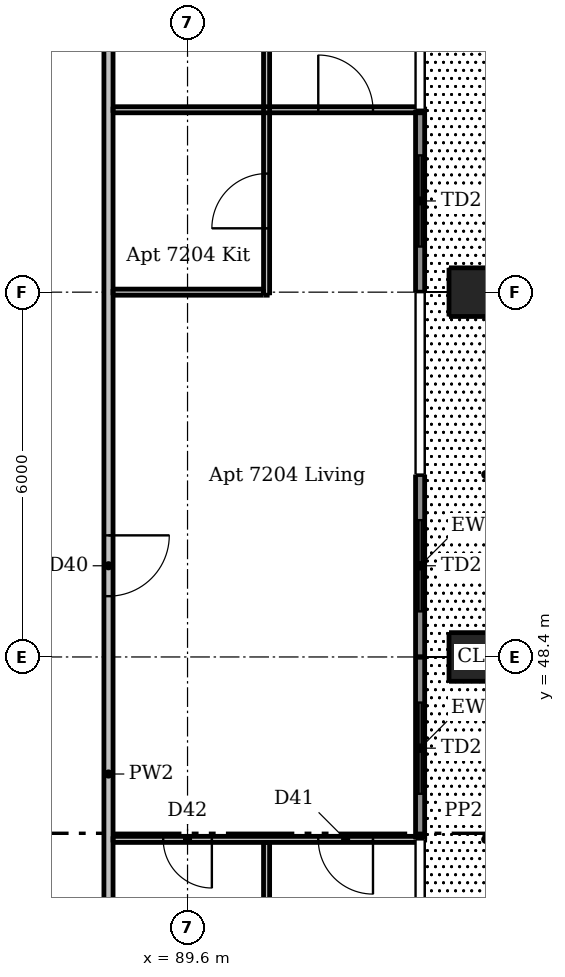
"""IFC4 building model, lengths in metres.
Left out: names, types, materials, properties, quantities, classifications, styles, units other than length and angle.
Written with IfcOpenShell. Run it as: python <this file> out.ifc"""

import sys

from ifc_helpers import new_model, si_unit, direction, frame, frame_2d, origin, origin_2d, place, context, subcontext, project, spatial, rectangle, extrude, element, fill, save


model = new_model("IFC4")
c1 = context("Model", 3, precision=1e-05, world=origin(), true_north=direction((0.0, 1.0)))
c2 = subcontext(c1, "Body", "Model", "MODEL_VIEW")
j1 = project(units=[si_unit("LENGTHUNIT", "METRE"), si_unit("PLANEANGLEUNIT", "RADIAN")], contexts=[c1])
p1 = place(None, origin())
s1 = spatial("IfcSite", under=j1, at=p1, CompositionType="ELEMENT")
p2 = place(p1, origin())
s2 = spatial("IfcBuilding", under=s1, at=p2, CompositionType="ELEMENT")
p3 = place(p2, frame((0.0, 0.0, 268.6)))
s3 = spatial("IfcBuildingStorey", under=s2, at=p3, CompositionType="ELEMENT", Elevation=268.6)
for number, where, z_axis, x_axis in (
    (1, (94.3, 48.4, 0.0), (0.0, 0.0, 1.0), (1.0, 0.0, 0.0)),
    (2, (94.3, 54.4, 0.0), (0.0, 0.0, 1.0), (1.0, 0.0, 0.0)),
):
    element("IfcColumn", number, at=place(p3, frame(where, z_axis=z_axis, x_axis=x_axis)), inside=s3, PredefinedType="COLUMN", context=c2, shape_type="SweptSolid", body=[
        extrude(rectangle(XDim=0.8, YDim=0.8, at=origin_2d()), origin(), (0.0, 0.0, 1.0), 3.3),
    ])
p4 = place(p3, frame((93.425, 45.4, 0.0), z_axis=(0.0, 0.0, 1.0), x_axis=(0.0, 1.0, 0.0)))
e3 = element("IfcWall", 3, at=p4, inside=s3, PredefinedType="SOLIDWALL", context=c2, shape_type="SweptSolid", body=[
    extrude(rectangle(XDim=3.0, YDim=0.15, at=frame_2d((1.5, 0.0))), origin(), (0.0, 0.0, 1.0), 3.05),
])
p5 = place(p4, frame((0.75, 0.0, 0.0)))
e4 = element("IfcOpeningElement", 4, at=p5, cuts=e3, PredefinedType="OPENING", context=c2, shape_type="SweptSolid", body=[
    extrude(rectangle(XDim=1.5, YDim=2.4, at=frame_2d((0.75, 1.2))), frame((0.0, 0.085, 0.0), z_axis=(0.0, -1.0, 0.0), x_axis=(1.0, 0.0, 0.0)), (0.0, 0.0, 1.0), 0.17),
])
p6 = place(p3, frame((93.425, 48.4, 0.0), z_axis=(0.0, 0.0, 1.0), x_axis=(0.0, 1.0, 0.0)))
e5 = element("IfcWall", 5, at=p6, inside=s3, PredefinedType="SOLIDWALL", context=c2, shape_type="SweptSolid", body=[
    extrude(rectangle(XDim=3.0, YDim=0.15, at=frame_2d((1.5, 0.0))), origin(), (0.0, 0.0, 1.0), 3.05),
])
p7 = place(p6, frame((0.75, 0.0, 0.0)))
e6 = element("IfcOpeningElement", 6, at=p7, cuts=e5, PredefinedType="OPENING", context=c2, shape_type="SweptSolid", body=[
    extrude(rectangle(XDim=1.5, YDim=2.4, at=frame_2d((0.75, 1.2))), frame((0.0, 0.085, 0.0), z_axis=(0.0, -1.0, 0.0), x_axis=(1.0, 0.0, 0.0)), (0.0, 0.0, 1.0), 0.17),
])
p8 = place(p3, frame((93.425, 54.4, 0.0), z_axis=(0.0, 0.0, 1.0), x_axis=(0.0, 1.0, 0.0)))
e7 = element("IfcWall", 7, at=p8, inside=s3, PredefinedType="SOLIDWALL", context=c2, shape_type="SweptSolid", body=[
    extrude(rectangle(XDim=3.0, YDim=0.15, at=frame_2d((1.5, 0.0))), origin(), (0.0, 0.0, 1.0), 3.05),
])
p9 = place(p8, frame((0.75, 0.0, 0.0)))
e8 = element("IfcOpeningElement", 8, at=p9, cuts=e7, PredefinedType="OPENING", context=c2, shape_type="SweptSolid", body=[
    extrude(rectangle(XDim=1.5, YDim=2.4, at=frame_2d((0.75, 1.2))), frame((0.0, 0.085, 0.0), z_axis=(0.0, -1.0, 0.0), x_axis=(1.0, 0.0, 0.0)), (0.0, 0.0, 1.0), 0.17),
])
p10 = place(p3, frame((90.9, 41.75, 0.0), z_axis=(0.0, 0.0, 1.0), x_axis=(0.0, 1.0, 0.0)))
e9 = element("IfcWall", 9, at=p10, inside=s3, PredefinedType="PARTITIONING", context=c2, shape_type="SweptSolid", body=[
    extrude(rectangle(XDim=3.6, YDim=0.1, at=frame_2d((1.8, 0.0))), origin(), (0.0, 0.0, 1.0), 3.05),
])
p11 = place(p3, frame((90.9, 54.35, 0.0), z_axis=(0.0, 0.0, 1.0), x_axis=(0.0, 1.0, 0.0)))
e10 = element("IfcWall", 10, at=p11, inside=s3, PredefinedType="PARTITIONING", context=c2, shape_type="SweptSolid", body=[
    extrude(rectangle(XDim=5.975, YDim=0.1, at=frame_2d((2.987, 0.0))), origin(), (0.0, 0.0, 1.0), 3.05),
])
p12 = place(p11, frame((1.1, 0.0, 0.0)))
e11 = element("IfcOpeningElement", 11, at=p12, cuts=e10, PredefinedType="OPENING", context=c2, shape_type="SweptSolid", body=[
    extrude(rectangle(XDim=0.9, YDim=2.1, at=frame_2d((0.45, 1.05))), frame((0.0, 0.06, 0.0), z_axis=(0.0, -1.0, 0.0), x_axis=(1.0, 0.0, 0.0)), (0.0, 0.0, 1.0), 0.12),
])
p13 = place(p11, frame((4.15, 0.0, 0.0)))
e12 = element("IfcOpeningElement", 12, at=p13, cuts=e10, PredefinedType="OPENING", context=c2, shape_type="SweptSolid", body=[
    extrude(rectangle(XDim=0.8, YDim=2.1, at=frame_2d((0.4, 1.05))), frame((0.0, 0.06, 0.0), z_axis=(0.0, -1.0, 0.0), x_axis=(1.0, 0.0, 0.0)), (0.0, 0.0, 1.0), 0.12),
])
p14 = place(p3, frame((88.375, 57.4, 0.0), z_axis=(0.0, 0.0, 1.0), x_axis=(1.0, 0.0, 0.0)))
e13 = element("IfcWall", 13, at=p14, inside=s3, PredefinedType="PARTITIONING", context=c2, shape_type="SweptSolid", body=[
    extrude(rectangle(XDim=5.125, YDim=0.1, at=frame_2d((2.562, 0.0))), origin(), (0.0, 0.0, 1.0), 3.05),
])
p15 = place(p14, frame((3.375, 0.0, 0.0)))
e14 = element("IfcOpeningElement", 14, at=p15, cuts=e13, PredefinedType="OPENING", context=c2, shape_type="SweptSolid", body=[
    extrude(rectangle(XDim=0.9, YDim=2.1, at=frame_2d((0.45, 1.05))), frame((0.0, 0.06, 0.0), z_axis=(0.0, -1.0, 0.0), x_axis=(1.0, 0.0, 0.0)), (0.0, 0.0, 1.0), 0.12),
])
p16 = place(p3, frame((88.375, 54.4, 0.0), z_axis=(0.0, 0.0, 1.0), x_axis=(1.0, 0.0, 0.0)))
e15 = element("IfcWall", 15, at=p16, inside=s3, PredefinedType="PARTITIONING", context=c2, shape_type="SweptSolid", body=[
    extrude(rectangle(XDim=2.475, YDim=0.1, at=frame_2d((1.238, 0.0))), origin(), (0.0, 0.0, 1.0), 2.59),
])
p17 = place(p3, frame((93.5, 45.4, 0.0), z_axis=(0.0, 0.0, 1.0), x_axis=(-1.0, 0.0, 0.0)))
e16 = element("IfcWall", 16, at=p17, inside=s3, PredefinedType="PARTITIONING", context=c2, shape_type="SweptSolid", body=[
    extrude(rectangle(XDim=5.125, YDim=0.1, at=frame_2d((2.562, 0.0))), origin(), (0.0, 0.0, 1.0), 3.05),
])
p18 = place(p17, frame((0.85, 0.0, 0.0)))
e17 = element("IfcOpeningElement", 17, at=p18, cuts=e16, PredefinedType="OPENING", context=c2, shape_type="SweptSolid", body=[
    extrude(rectangle(XDim=0.9, YDim=2.1, at=frame_2d((0.45, 1.05))), frame((0.0, 0.06, 0.0), z_axis=(0.0, -1.0, 0.0), x_axis=(1.0, 0.0, 0.0)), (0.0, 0.0, 1.0), 0.12),
])
p19 = place(p17, frame((3.5, 0.0, 0.0)))
e18 = element("IfcOpeningElement", 18, at=p19, cuts=e16, PredefinedType="OPENING", context=c2, shape_type="SweptSolid", body=[
    extrude(rectangle(XDim=0.8, YDim=2.1, at=frame_2d((0.4, 1.05))), frame((0.0, 0.06, 0.0), z_axis=(0.0, -1.0, 0.0), x_axis=(1.0, 0.0, 0.0)), (0.0, 0.0, 1.0), 0.12),
])
p20 = place(p3, frame((88.3, 61.175, 0.0), z_axis=(0.0, 0.0, 1.0), x_axis=(0.0, -1.0, 0.0)))
e19 = element("IfcWall", 19, at=p20, inside=s3, PredefinedType="PARTITIONING", context=c2, shape_type="SweptSolid", body=[
    extrude(rectangle(XDim=29.4, YDim=0.15, at=frame_2d((14.7, 0.0))), origin(), (0.0, 0.0, 1.0), 3.05),
])
p21 = place(p20, frame((28.113, 0.0, 0.0)))
e20 = element("IfcOpeningElement", 20, at=p21, cuts=e19, PredefinedType="OPENING", context=c2, shape_type="SweptSolid", body=[
    extrude(rectangle(XDim=1.0, YDim=2.1, at=frame_2d((0.5, 1.05))), frame((0.0, 0.085, 0.0), z_axis=(0.0, -1.0, 0.0), x_axis=(1.0, 0.0, 0.0)), (0.0, 0.0, 1.0), 0.17),
])
p22 = place(p20, frame((10.775, 0.0, 0.0)))
e21 = element("IfcOpeningElement", 21, at=p22, cuts=e19, PredefinedType="OPENING", context=c2, shape_type="SweptSolid", body=[
    extrude(rectangle(XDim=1.0, YDim=2.1, at=frame_2d((0.5, 1.05))), frame((0.0, 0.085, 0.0), z_axis=(0.0, -1.0, 0.0), x_axis=(1.0, 0.0, 0.0)), (0.0, 0.0, 1.0), 0.17),
])
p23 = place(p5, origin())
e22 = element("IfcDoor", 22, at=p23, inside=s3, OperationType="DOUBLE_DOOR_SLIDING", PredefinedType="DOOR", context=c2, shape_type="SweptSolid", body=[
    extrude(rectangle(XDim=1.5, YDim=2.4, at=frame_2d((0.75, 1.2))), frame((0.0, 0.025, 0.0), z_axis=(0.0, -1.0, 0.0), x_axis=(1.0, 0.0, 0.0)), (0.0, 0.0, 1.0), 0.05),
])
fill(e4, e22)
p24 = place(p7, origin())
e23 = element("IfcDoor", 23, at=p24, inside=s3, OperationType="DOUBLE_DOOR_SLIDING", PredefinedType="DOOR", context=c2, shape_type="SweptSolid", body=[
    extrude(rectangle(XDim=1.5, YDim=2.4, at=frame_2d((0.75, 1.2))), frame((0.0, 0.025, 0.0), z_axis=(0.0, -1.0, 0.0), x_axis=(1.0, 0.0, 0.0)), (0.0, 0.0, 1.0), 0.05),
])
fill(e6, e23)
p25 = place(p9, origin())
e24 = element("IfcDoor", 24, at=p25, inside=s3, OperationType="DOUBLE_DOOR_SLIDING", PredefinedType="DOOR", context=c2, shape_type="SweptSolid", body=[
    extrude(rectangle(XDim=1.5, YDim=2.4, at=frame_2d((0.75, 1.2))), frame((0.0, 0.025, 0.0), z_axis=(0.0, -1.0, 0.0), x_axis=(1.0, 0.0, 0.0)), (0.0, 0.0, 1.0), 0.05),
])
fill(e8, e24)
p26 = place(p22, origin())
e25 = element("IfcDoor", 25, at=p26, inside=s3, OperationType="SINGLE_SWING_LEFT", PredefinedType="DOOR", context=c2, shape_type="SweptSolid", body=[
    extrude(rectangle(XDim=1.0, YDim=2.1, at=frame_2d((0.5, 1.05))), frame((0.0, 0.025, 0.0), z_axis=(0.0, -1.0, 0.0), x_axis=(1.0, 0.0, 0.0)), (0.0, 0.0, 1.0), 0.05),
])
fill(e21, e25)
p27 = place(p12, origin())
e26 = element("IfcDoor", 26, at=p27, inside=s3, OperationType="SINGLE_SWING_LEFT", PredefinedType="DOOR", context=c2, shape_type="SweptSolid", body=[
    extrude(rectangle(XDim=0.9, YDim=2.1, at=frame_2d((0.45, 1.05))), frame((0.0, 0.025, 0.0), z_axis=(0.0, -1.0, 0.0), x_axis=(1.0, 0.0, 0.0)), (0.0, 0.0, 1.0), 0.05),
])
fill(e11, e26)
p28 = place(p18, origin())
e27 = element("IfcDoor", 27, at=p28, inside=s3, OperationType="SINGLE_SWING_LEFT", PredefinedType="DOOR", context=c2, shape_type="SweptSolid", body=[
    extrude(rectangle(XDim=0.9, YDim=2.1, at=frame_2d((0.45, 1.05))), frame((0.0, 0.025, 0.0), z_axis=(0.0, -1.0, 0.0), x_axis=(1.0, 0.0, 0.0)), (0.0, 0.0, 1.0), 0.05),
])
fill(e17, e27)
p29 = place(p19, origin())
e28 = element("IfcDoor", 28, at=p29, inside=s3, OperationType="SINGLE_SWING_LEFT", PredefinedType="DOOR", context=c2, shape_type="SweptSolid", body=[
    extrude(rectangle(XDim=0.8, YDim=2.1, at=frame_2d((0.4, 1.05))), frame((0.0, 0.025, 0.0), z_axis=(0.0, -1.0, 0.0), x_axis=(1.0, 0.0, 0.0)), (0.0, 0.0, 1.0), 0.05),
])
fill(e18, e28)
p30 = place(p15, origin())
e29 = element("IfcDoor", 29, at=p30, inside=s3, OperationType="SINGLE_SWING_LEFT", PredefinedType="DOOR", context=c2, shape_type="SweptSolid", body=[
    extrude(rectangle(XDim=0.9, YDim=2.1, at=frame_2d((0.45, 1.05))), frame((0.0, 0.025, 0.0), z_axis=(0.0, -1.0, 0.0), x_axis=(1.0, 0.0, 0.0)), (0.0, 0.0, 1.0), 0.05),
])
fill(e14, e29)
save(model, sys.argv[1])
